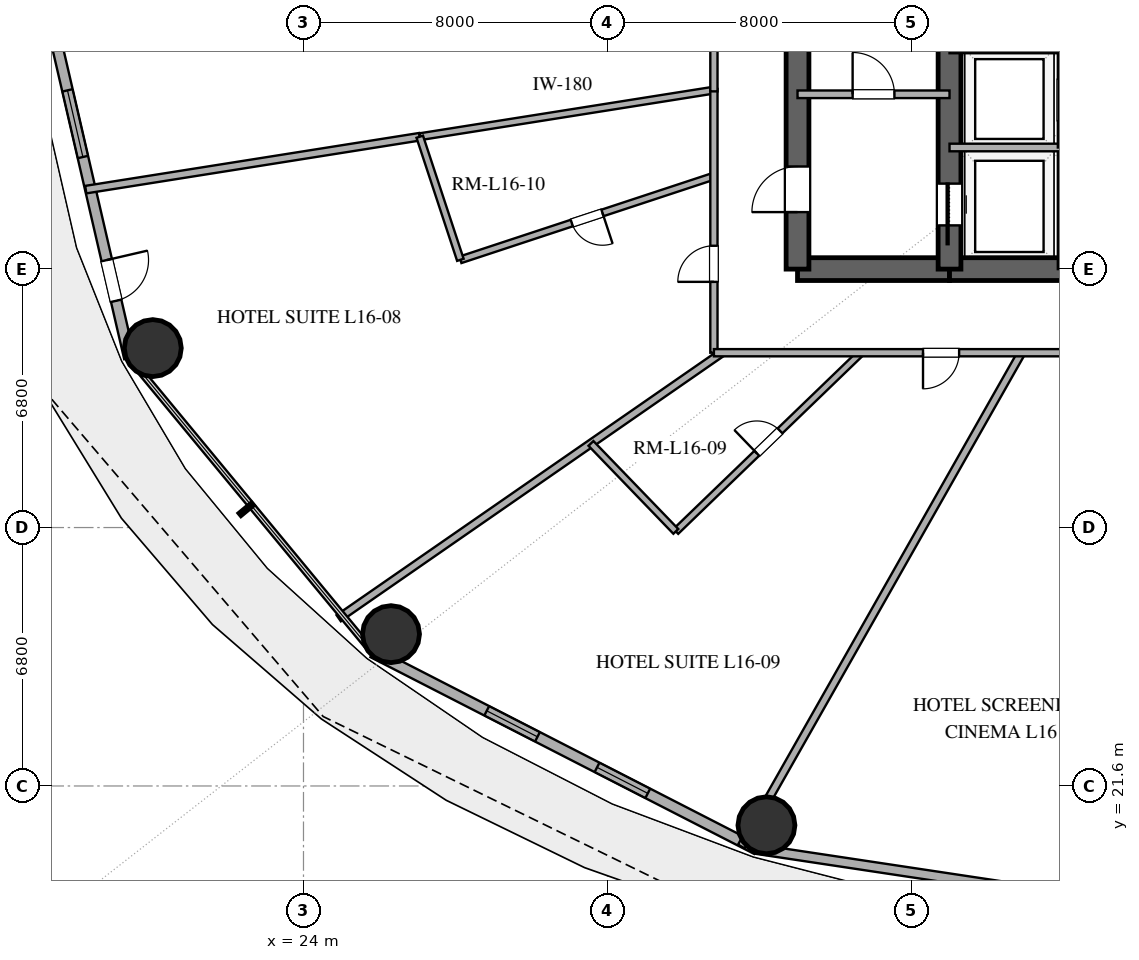
"""IFC4 building model, lengths in metres.
Left out: names, types, materials, properties, quantities, classifications, styles, units other than length and angle.
Written with IfcOpenShell. Run it as: python <this file> out.ifc"""

import sys

from ifc_helpers import new_model, si_unit, direction, frame, frame_2d, origin, origin_2d, place, context, subcontext, project, spatial, rectangle, hollow_circle, extrude, element, fill, save


model = new_model("IFC4")
c1 = context("Model", 3, precision=1e-05, world=origin(), true_north=direction((0.0, 1.0)))
c2 = subcontext(c1, "Body", "Model", "MODEL_VIEW")
j1 = project(units=[si_unit("LENGTHUNIT", "METRE"), si_unit("PLANEANGLEUNIT", "RADIAN")], contexts=[c1])
p1 = place(None, origin())
s1 = spatial("IfcSite", under=j1, at=p1, CompositionType="ELEMENT")
p2 = place(p1, origin())
s2 = spatial("IfcBuilding", under=s1, at=p2, CompositionType="ELEMENT")
p3 = place(p2, frame((0.0, 0.0, 67.8)))
s3 = spatial("IfcBuildingStorey", under=s2, at=p3, CompositionType="ELEMENT", Elevation=67.8)
p4 = place(p3, frame((37.0, 35.2, 0.0), z_axis=(0.0, 0.0, 1.0), x_axis=(1.0, 0.0, 0.0)))
e1 = element("IfcWall", 1, at=p4, inside=s3, PredefinedType="SHEAR", context=c2, shape_type="SweptSolid", body=[
    extrude(rectangle(XDim=4.0, YDim=0.6, at=frame_2d((2.0, 0.0))), origin(), (0.0, 0.0, 1.0), 3.38),
])
p5 = place(p3, frame((41.0, 35.2, 0.0), z_axis=(0.0, 0.0, 1.0), x_axis=(1.0, 0.0, 0.0)))
e2 = element("IfcWall", 2, at=p5, inside=s3, PredefinedType="SHEAR", context=c2, shape_type="SweptSolid", body=[
    extrude(rectangle(XDim=14.0, YDim=0.6, at=frame_2d((7.0, 0.0))), origin(), (0.0, 0.0, 1.0), 3.38),
])
p6 = place(p5, frame((6.1, 0.0, 0.0)))
e3 = element("IfcOpeningElement", 3, at=p6, cuts=e2, PredefinedType="OPENING", context=c2, shape_type="SweptSolid", body=[
    extrude(rectangle(XDim=1.8, YDim=2.25, at=frame_2d((0.9, 1.125))), frame((0.0, 0.31, 0.0), z_axis=(0.0, -1.0, 0.0), x_axis=(1.0, 0.0, 0.0)), (0.0, 0.0, 1.0), 0.62),
])
p7 = place(p3, frame((37.0, 35.2, 0.0), z_axis=(0.0, 0.0, 1.0), x_axis=(0.0, 1.0, 0.0)))
e4 = element("IfcWall", 4, at=p7, inside=s3, PredefinedType="SHEAR", context=c2, shape_type="SweptSolid", body=[
    extrude(rectangle(XDim=13.6, YDim=0.6, at=frame_2d((6.8, 0.0))), origin(), (0.0, 0.0, 1.0), 3.38),
])
p8 = place(p7, frame((1.5, 0.0, 0.0)))
e5 = element("IfcOpeningElement", 5, at=p8, cuts=e4, PredefinedType="OPENING", context=c2, shape_type="SweptSolid", body=[
    extrude(rectangle(XDim=1.2, YDim=2.15, at=frame_2d((0.6, 1.075))), frame((0.0, 0.31, 0.0), z_axis=(0.0, -1.0, 0.0), x_axis=(1.0, 0.0, 0.0)), (0.0, 0.0, 1.0), 0.62),
])
p9 = place(p3, frame((41.0, 35.2, 0.0), z_axis=(0.0, 0.0, 1.0), x_axis=(0.0, 1.0, 0.0)))
e6 = element("IfcWall", 6, at=p9, inside=s3, PredefinedType="SHEAR", context=c2, shape_type="SweptSolid", body=[
    extrude(rectangle(XDim=13.6, YDim=0.6, at=frame_2d((6.8, 0.0))), origin(), (0.0, 0.0, 1.0), 3.38),
])
p10 = place(p9, frame((1.15, 0.0, 0.0)))
e7 = element("IfcOpeningElement", 7, at=p10, cuts=e6, PredefinedType="OPENING", context=c2, shape_type="SweptSolid", body=[
    extrude(rectangle(XDim=1.1, YDim=2.2, at=frame_2d((0.55, 1.1))), frame((0.0, 0.31, 0.0), z_axis=(0.0, -1.0, 0.0), x_axis=(1.0, 0.0, 0.0)), (0.0, 0.0, 1.0), 0.62),
])
for number, where, z_axis, x_axis in (
    (8, (20.034, 33.122, 0.0), (0.0, 0.0, 1.0), (1.0, 0.0, 0.0)),
    (9, (26.303, 25.595, 0.0), (0.0, 0.0, 1.0), (1.0, 0.0, 0.0)),
    (10, (36.182, 20.566, 0.0), (0.0, 0.0, 1.0), (1.0, 0.0, 0.0)),
):
    element("IfcColumn", number, at=place(p3, frame(where, z_axis=z_axis, x_axis=x_axis)), inside=s3, PredefinedType="COLUMN", context=c2, shape_type="SweptSolid", body=[
        extrude(hollow_circle(Radius=0.75, WallThickness=0.04, at=origin_2d()), origin(), (0.0, 0.0, 1.0), 3.38),
    ])
p11 = place(p3, frame((17.304, 42.0, 0.0), z_axis=(0.0, 0.0, 1.0), x_axis=(0.225454452941, -0.974253709076, 0.0)))
e11 = element("IfcWall", 11, at=p11, inside=s3, PredefinedType="SOLIDWALL", context=c2, shape_type="SweptSolid", body=[
    extrude(rectangle(XDim=9.38, YDim=0.28, at=frame_2d((4.69, 0.0))), origin(), (0.0, 0.0, 1.0), 3.38),
])
p12 = place(p11, frame((2.152, 0.0, 0.85)))
e12 = element("IfcOpeningElement", 12, at=p12, cuts=e11, PredefinedType="OPENING", context=c2, shape_type="SweptSolid", body=[
    extrude(rectangle(XDim=1.8, YDim=2.2, at=frame_2d((0.9, 1.1))), frame((0.0, 0.15, 0.0), z_axis=(0.0, -1.0, 0.0), x_axis=(1.0, 0.0, 0.0)), (0.0, 0.0, 1.0), 0.3),
])
p13 = place(p11, frame((6.735, 0.0, 0.0)))
e13 = element("IfcOpeningElement", 13, at=p13, cuts=e11, PredefinedType="OPENING", context=c2, shape_type="SweptSolid", body=[
    extrude(rectangle(XDim=1.1, YDim=2.25, at=frame_2d((0.55, 1.125))), frame((0.0, 0.15, 0.0), z_axis=(0.0, -1.0, 0.0), x_axis=(1.0, 0.0, 0.0)), (0.0, 0.0, 1.0), 0.3),
])
p14 = place(p3, frame((25.826, 25.114, 0.0), z_axis=(0.0, 0.0, 1.0), x_axis=(0.889853976658, -0.456245438581, 0.0)))
e14 = element("IfcWall", 14, at=p14, inside=s3, PredefinedType="SOLIDWALL", context=c2, shape_type="SweptSolid", body=[
    extrude(rectangle(XDim=11.346, YDim=0.28, at=frame_2d((5.673, 0.0))), origin(), (0.0, 0.0, 1.0), 3.38),
])
p15 = place(p14, frame((3.367, 0.0, 0.85)))
e15 = element("IfcOpeningElement", 15, at=p15, cuts=e14, PredefinedType="OPENING", context=c2, shape_type="SweptSolid", body=[
    extrude(rectangle(XDim=1.5, YDim=2.0, at=frame_2d((0.75, 1.0))), frame((0.0, 0.15, 0.0), z_axis=(0.0, -1.0, 0.0), x_axis=(1.0, 0.0, 0.0)), (0.0, 0.0, 1.0), 0.3),
])
p16 = place(p14, frame((6.629, 0.0, 0.85)))
e16 = element("IfcOpeningElement", 16, at=p16, cuts=e14, PredefinedType="OPENING", context=c2, shape_type="SweptSolid", body=[
    extrude(rectangle(XDim=1.5, YDim=2.0, at=frame_2d((0.75, 1.0))), frame((0.0, 0.15, 0.0), z_axis=(0.0, -1.0, 0.0), x_axis=(1.0, 0.0, 0.0)), (0.0, 0.0, 1.0), 0.3),
])
p17 = place(p3, frame((35.922, 19.938, 0.0), z_axis=(0.0, 0.0, 1.0), x_axis=(0.988864835849, -0.148816452121, 0.0)))
e17 = element("IfcWall", 17, at=p17, inside=s3, PredefinedType="SOLIDWALL", context=c2, shape_type="SweptSolid", body=[
    extrude(rectangle(XDim=12.214, YDim=0.25, at=frame_2d((6.107, 0.0))), origin(), (0.0, 0.0, 1.0), 3.38),
])
p18 = place(p3, frame((37.0, 39.8, 0.0), z_axis=(0.0, 0.0, 1.0), x_axis=(1.0, 0.0, 0.0)))
e18 = element("IfcWall", 18, at=p18, inside=s3, PredefinedType="SOLIDWALL", context=c2, shape_type="SweptSolid", body=[
    extrude(rectangle(XDim=4.0, YDim=0.2, at=frame_2d((2.0, 0.0))), origin(), (0.0, 0.0, 1.0), 2.74),
])
p19 = place(p18, frame((1.45, 0.0, 0.0)))
e19 = element("IfcOpeningElement", 19, at=p19, cuts=e18, PredefinedType="OPENING", context=c2, shape_type="SweptSolid", body=[
    extrude(rectangle(XDim=1.1, YDim=2.15, at=frame_2d((0.55, 1.075))), frame((0.0, 0.11, 0.0), z_axis=(0.0, -1.0, 0.0), x_axis=(1.0, 0.0, 0.0)), (0.0, 0.0, 1.0), 0.22),
])
p20 = place(p3, frame((43.95, 35.2, 0.0), z_axis=(0.0, 0.0, 1.0), x_axis=(0.0, 1.0, 0.0)))
e20 = element("IfcWall", 20, at=p20, inside=s3, PredefinedType="SOLIDWALL", context=c2, shape_type="SweptSolid", body=[
    extrude(rectangle(XDim=3.2, YDim=0.2, at=frame_2d((1.6, 0.0))), origin(), (0.0, 0.0, 1.0), 2.74),
])
p21 = place(p3, frame((41.0, 38.4, 0.0), z_axis=(0.0, 0.0, 1.0), x_axis=(1.0, 0.0, 0.0)))
e21 = element("IfcWall", 21, at=p21, inside=s3, PredefinedType="SOLIDWALL", context=c2, shape_type="SweptSolid", body=[
    extrude(rectangle(XDim=2.95, YDim=0.2, at=frame_2d((1.475, 0.0))), origin(), (0.0, 0.0, 1.0), 2.74),
])
p22 = place(p3, frame((43.95, 38.4, 0.0), z_axis=(0.0, 0.0, 1.0), x_axis=(0.0, 1.0, 0.0)))
e22 = element("IfcWall", 22, at=p22, inside=s3, PredefinedType="SOLIDWALL", context=c2, shape_type="SweptSolid", body=[
    extrude(rectangle(XDim=7.8, YDim=0.2, at=frame_2d((3.9, 0.0))), origin(), (0.0, 0.0, 1.0), 2.74),
])
p23 = place(p22, frame((0.7, 0.0, 0.0)))
e23 = element("IfcOpeningElement", 23, at=p23, cuts=e22, PredefinedType="OPENING", context=c2, shape_type="SweptSolid", body=[
    extrude(rectangle(XDim=1.1, YDim=2.2, at=frame_2d((0.55, 1.1))), frame((0.0, 0.11, 0.0), z_axis=(0.0, -1.0, 0.0), x_axis=(1.0, 0.0, 0.0)), (0.0, 0.0, 1.0), 0.22),
])
p24 = place(p22, frame((3.3, 0.0, 0.0)))
e24 = element("IfcOpeningElement", 24, at=p24, cuts=e22, PredefinedType="OPENING", context=c2, shape_type="SweptSolid", body=[
    extrude(rectangle(XDim=1.1, YDim=2.2, at=frame_2d((0.55, 1.1))), frame((0.0, 0.11, 0.0), z_axis=(0.0, -1.0, 0.0), x_axis=(1.0, 0.0, 0.0)), (0.0, 0.0, 1.0), 0.22),
])
p25 = place(p3, frame((41.0, 40.98, 0.0), z_axis=(0.0, 0.0, 1.0), x_axis=(1.0, 0.0, 0.0)))
e25 = element("IfcWall", 25, at=p25, inside=s3, PredefinedType="SOLIDWALL", context=c2, shape_type="SweptSolid", body=[
    extrude(rectangle(XDim=2.95, YDim=0.2, at=frame_2d((1.475, 0.0))), origin(), (0.0, 0.0, 1.0), 2.74),
])
p26 = place(p3, frame((42.893, 33.0, 0.0), z_axis=(0.0, 0.0, 1.0), x_axis=(-0.493512300658, -0.869738816599, 0.0)))
e26 = element("IfcWall", 26, at=p26, inside=s3, PredefinedType="PARTITIONING", context=c2, shape_type="SweptSolid", body=[
    extrude(rectangle(XDim=14.938, YDim=0.2, at=frame_2d((7.469, 0.0))), origin(), (0.0, 0.0, 1.0), 2.74),
])
p27 = place(p3, frame((18.271, 37.292, 0.0), z_axis=(0.0, 0.0, 1.0), x_axis=(0.987691229297, 0.156416225401, 0.0)))
e27 = element("IfcWall", 27, at=p27, inside=s3, PredefinedType="PARTITIONING", context=c2, shape_type="SweptSolid", body=[
    extrude(rectangle(XDim=8.898, YDim=0.2, at=frame_2d((4.449, 0.0))), origin(), (0.0, 0.0, 1.0), 2.74),
])
p28 = place(p3, frame((35.009, 33.0, 0.0), z_axis=(0.0, 0.0, 1.0), x_axis=(-0.821999402566, -0.569488351226, 0.0)))
e28 = element("IfcWall", 28, at=p28, inside=s3, PredefinedType="PARTITIONING", context=c2, shape_type="SweptSolid", body=[
    extrude(rectangle(XDim=12.266, YDim=0.2, at=frame_2d((6.133, 0.0))), origin(), (0.0, 0.0, 1.0), 2.74),
])
p29 = place(p3, frame((27.06, 38.683, 0.0), z_axis=(0.0, 0.0, 1.0), x_axis=(0.987690363599, 0.156421691762, 0.0)))
e29 = element("IfcWall", 29, at=p29, inside=s3, PredefinedType="PLUMBINGWALL", context=c2, shape_type="SweptSolid", body=[
    extrude(rectangle(XDim=7.837, YDim=0.18, at=frame_2d((3.918, 0.0))), origin(), (0.0, 0.0, 1.0), 2.74),
])
p30 = place(p3, frame((34.8, 37.646, 0.0), z_axis=(0.0, 0.0, 1.0), x_axis=(-0.949662150081, -0.313275917849, 0.0)))
e30 = element("IfcWall", 30, at=p30, inside=s3, PredefinedType="PLUMBINGWALL", context=c2, shape_type="SweptSolid", body=[
    extrude(rectangle(XDim=7.026, YDim=0.18, at=frame_2d((3.513, 0.0))), origin(), (0.0, 0.0, 1.0), 2.74),
])
p31 = place(p30, frame((3.088, 0.0, 0.0)))
e31 = element("IfcOpeningElement", 31, at=p31, cuts=e30, PredefinedType="OPENING", context=c2, shape_type="SweptSolid", body=[
    extrude(rectangle(XDim=0.85, YDim=2.1, at=frame_2d((0.425, 1.05))), frame((0.0, 0.1, 0.0), z_axis=(0.0, -1.0, 0.0), x_axis=(1.0, 0.0, 0.0)), (0.0, 0.0, 1.0), 0.2),
])
p32 = place(p3, frame((33.798, 28.299, 0.0), z_axis=(0.0, 0.0, 1.0), x_axis=(0.719667322044, 0.69431905172, 0.0)))
e32 = element("IfcWall", 32, at=p32, inside=s3, PredefinedType="PLUMBINGWALL", context=c2, shape_type="SweptSolid", body=[
    extrude(rectangle(XDim=6.771, YDim=0.18, at=frame_2d((3.385, 0.0))), origin(), (0.0, 0.0, 1.0), 2.74),
])
p33 = place(p32, frame((2.96, 0.0, 0.0)))
e33 = element("IfcOpeningElement", 33, at=p33, cuts=e32, PredefinedType="OPENING", context=c2, shape_type="SweptSolid", body=[
    extrude(rectangle(XDim=0.85, YDim=2.1, at=frame_2d((0.425, 1.05))), frame((0.0, 0.1, 0.0), z_axis=(0.0, -1.0, 0.0), x_axis=(1.0, 0.0, 0.0)), (0.0, 0.0, 1.0), 0.2),
])
p34 = place(p3, frame((34.8, 33.0, 0.0), z_axis=(0.0, 0.0, 1.0), x_axis=(0.0, 1.0, 0.0)))
e34 = element("IfcWall", 34, at=p34, inside=s3, PredefinedType="PARTITIONING", context=c2, shape_type="SweptSolid", body=[
    extrude(rectangle(XDim=6.942, YDim=0.19, at=frame_2d((3.471, 0.0))), origin(), (0.0, 0.0, 1.0), 2.74),
])
p35 = place(p34, frame((1.865, 0.0, 0.0)))
e35 = element("IfcOpeningElement", 35, at=p35, cuts=e34, PredefinedType="OPENING", context=c2, shape_type="SweptSolid", body=[
    extrude(rectangle(XDim=0.95, YDim=2.15, at=frame_2d((0.475, 1.075))), frame((0.0, 0.105, 0.0), z_axis=(0.0, -1.0, 0.0), x_axis=(1.0, 0.0, 0.0)), (0.0, 0.0, 1.0), 0.21),
])
p36 = place(p3, frame((47.425, 33.0, 0.0), z_axis=(0.0, 0.0, 1.0), x_axis=(-1.0, 0.0, 0.0)))
e36 = element("IfcWall", 36, at=p36, inside=s3, PredefinedType="PARTITIONING", context=c2, shape_type="SweptSolid", body=[
    extrude(rectangle(XDim=12.625, YDim=0.19, at=frame_2d((6.312, 0.0))), origin(), (0.0, 0.0, 1.0), 2.74),
])
p37 = place(p36, frame((1.784, 0.0, 0.0)))
e37 = element("IfcOpeningElement", 37, at=p37, cuts=e36, PredefinedType="OPENING", context=c2, shape_type="SweptSolid", body=[
    extrude(rectangle(XDim=1.0, YDim=2.2, at=frame_2d((0.5, 1.1))), frame((0.0, 0.105, 0.0), z_axis=(0.0, -1.0, 0.0), x_axis=(1.0, 0.0, 0.0)), (0.0, 0.0, 1.0), 0.21),
])
p38 = place(p36, frame((6.173, 0.0, 0.0)))
e38 = element("IfcOpeningElement", 38, at=p38, cuts=e36, PredefinedType="OPENING", context=c2, shape_type="SweptSolid", body=[
    extrude(rectangle(XDim=0.95, YDim=2.15, at=frame_2d((0.475, 1.075))), frame((0.0, 0.105, 0.0), z_axis=(0.0, -1.0, 0.0), x_axis=(1.0, 0.0, 0.0)), (0.0, 0.0, 1.0), 0.21),
])
p39 = place(p3, frame((34.8, 39.877, 0.0), z_axis=(0.0, 0.0, 1.0), x_axis=(0.0, 1.0, 0.0)))
e39 = element("IfcWall", 39, at=p39, inside=s3, PredefinedType="PARTITIONING", context=c2, shape_type="SweptSolid", body=[
    extrude(rectangle(XDim=3.883, YDim=0.19, at=frame_2d((1.941, 0.0))), origin(), (0.0, 0.0, 1.0), 2.74),
])
p40 = place(p39, frame((1.467, 0.0, 0.0)))
e40 = element("IfcOpeningElement", 40, at=p40, cuts=e39, PredefinedType="OPENING", context=c2, shape_type="SweptSolid", body=[
    extrude(rectangle(XDim=0.95, YDim=2.15, at=frame_2d((0.475, 1.075))), frame((0.0, 0.105, 0.0), z_axis=(0.0, -1.0, 0.0), x_axis=(1.0, 0.0, 0.0)), (0.0, 0.0, 1.0), 0.21),
])
p41 = place(p3, frame((28.128, 35.445, 0.0), z_axis=(0.0, 0.0, 1.0), x_axis=(-0.313262541659, 0.949666562533, 0.0)))
e41 = element("IfcWall", 41, at=p41, inside=s3, PredefinedType="PLUMBINGWALL", context=c2, shape_type="SweptSolid", body=[
    extrude(rectangle(XDim=3.41, YDim=0.18, at=frame_2d((1.705, 0.0))), origin(), (0.0, 0.0, 1.0), 2.74),
])
p42 = place(p3, frame((31.565, 30.614, 0.0), z_axis=(0.0, 0.0, 1.0), x_axis=(0.694278833189, -0.719706121821, 0.0)))
e42 = element("IfcWall", 42, at=p42, inside=s3, PredefinedType="PLUMBINGWALL", context=c2, shape_type="SweptSolid", body=[
    extrude(rectangle(XDim=3.217, YDim=0.18, at=frame_2d((1.608, 0.0))), origin(), (0.0, 0.0, 1.0), 2.74),
])
p43 = place(p12, origin())
e43 = element("IfcWindow", 43, at=p43, inside=s3, PartitioningType="SINGLE_PANEL", PredefinedType="WINDOW", context=c2, shape_type="SweptSolid", body=[
    extrude(rectangle(XDim=1.8, YDim=2.2, at=frame_2d((0.9, 1.1))), frame((0.0, 0.03, 0.0), z_axis=(0.0, -1.0, 0.0), x_axis=(1.0, 0.0, 0.0)), (0.0, 0.0, 1.0), 0.06),
])
fill(e12, e43)
p44 = place(p13, origin())
e44 = element("IfcDoor", 44, at=p44, inside=s3, OperationType="SINGLE_SWING_LEFT", PredefinedType="DOOR", context=c2, shape_type="SweptSolid", body=[
    extrude(rectangle(XDim=1.1, YDim=2.25, at=frame_2d((0.55, 1.125))), frame((0.0, 0.025, 0.0), z_axis=(0.0, -1.0, 0.0), x_axis=(1.0, 0.0, 0.0)), (0.0, 0.0, 1.0), 0.05),
])
fill(e13, e44)
p45 = place(p15, origin())
e45 = element("IfcWindow", 45, at=p45, inside=s3, PartitioningType="SINGLE_PANEL", PredefinedType="WINDOW", context=c2, shape_type="SweptSolid", body=[
    extrude(rectangle(XDim=1.5, YDim=2.0, at=frame_2d((0.75, 1.0))), frame((0.0, 0.03, 0.0), z_axis=(0.0, -1.0, 0.0), x_axis=(1.0, 0.0, 0.0)), (0.0, 0.0, 1.0), 0.06),
])
fill(e15, e45)
p46 = place(p16, origin())
e46 = element("IfcWindow", 46, at=p46, inside=s3, PartitioningType="SINGLE_PANEL", PredefinedType="WINDOW", context=c2, shape_type="SweptSolid", body=[
    extrude(rectangle(XDim=1.5, YDim=2.0, at=frame_2d((0.75, 1.0))), frame((0.0, 0.03, 0.0), z_axis=(0.0, -1.0, 0.0), x_axis=(1.0, 0.0, 0.0)), (0.0, 0.0, 1.0), 0.06),
])
fill(e16, e46)
p47 = place(p10, origin())
e47 = element("IfcDoor", 47, at=p47, inside=s3, OperationType="SLIDING_TO_LEFT", PredefinedType="DOOR", context=c2, shape_type="SweptSolid", body=[
    extrude(rectangle(XDim=1.1, YDim=2.2, at=frame_2d((0.55, 1.1))), frame((0.0, 0.025, 0.0), z_axis=(0.0, -1.0, 0.0), x_axis=(1.0, 0.0, 0.0)), (0.0, 0.0, 1.0), 0.05),
])
fill(e7, e47)
p48 = place(p8, origin())
e48 = element("IfcDoor", 48, at=p48, inside=s3, OperationType="SINGLE_SWING_LEFT", PredefinedType="DOOR", context=c2, shape_type="SweptSolid", body=[
    extrude(rectangle(XDim=1.2, YDim=2.15, at=frame_2d((0.6, 1.075))), frame((0.0, 0.025, 0.0), z_axis=(0.0, -1.0, 0.0), x_axis=(1.0, 0.0, 0.0)), (0.0, 0.0, 1.0), 0.05),
])
fill(e5, e48)
p49 = place(p19, origin())
e49 = element("IfcDoor", 49, at=p49, inside=s3, OperationType="SINGLE_SWING_LEFT", PredefinedType="DOOR", context=c2, shape_type="SweptSolid", body=[
    extrude(rectangle(XDim=1.1, YDim=2.15, at=frame_2d((0.55, 1.075))), frame((0.0, 0.025, 0.0), z_axis=(0.0, -1.0, 0.0), x_axis=(1.0, 0.0, 0.0)), (0.0, 0.0, 1.0), 0.05),
])
fill(e19, e49)
p50 = place(p31, origin())
e50 = element("IfcDoor", 50, at=p50, inside=s3, OperationType="SINGLE_SWING_LEFT", PredefinedType="DOOR", context=c2, shape_type="SweptSolid", body=[
    extrude(rectangle(XDim=0.85, YDim=2.1, at=frame_2d((0.425, 1.05))), frame((0.0, 0.025, 0.0), z_axis=(0.0, -1.0, 0.0), x_axis=(1.0, 0.0, 0.0)), (0.0, 0.0, 1.0), 0.05),
])
fill(e31, e50)
p51 = place(p33, origin())
e51 = element("IfcDoor", 51, at=p51, inside=s3, OperationType="SINGLE_SWING_LEFT", PredefinedType="DOOR", context=c2, shape_type="SweptSolid", body=[
    extrude(rectangle(XDim=0.85, YDim=2.1, at=frame_2d((0.425, 1.05))), frame((0.0, 0.025, 0.0), z_axis=(0.0, -1.0, 0.0), x_axis=(1.0, 0.0, 0.0)), (0.0, 0.0, 1.0), 0.05),
])
fill(e33, e51)
p52 = place(p35, origin())
e52 = element("IfcDoor", 52, at=p52, inside=s3, OperationType="SINGLE_SWING_LEFT", PredefinedType="DOOR", context=c2, shape_type="SweptSolid", body=[
    extrude(rectangle(XDim=0.95, YDim=2.15, at=frame_2d((0.475, 1.075))), frame((0.0, 0.025, 0.0), z_axis=(0.0, -1.0, 0.0), x_axis=(1.0, 0.0, 0.0)), (0.0, 0.0, 1.0), 0.05),
])
fill(e35, e52)
p53 = place(p38, origin())
e53 = element("IfcDoor", 53, at=p53, inside=s3, OperationType="SINGLE_SWING_RIGHT", PredefinedType="DOOR", context=c2, shape_type="SweptSolid", body=[
    extrude(rectangle(XDim=0.95, YDim=2.15, at=frame_2d((0.475, 1.075))), frame((0.0, 0.025, 0.0), z_axis=(0.0, -1.0, 0.0), x_axis=(1.0, 0.0, 0.0)), (0.0, 0.0, 1.0), 0.05),
])
fill(e38, e53)
save(model, sys.argv[1])
